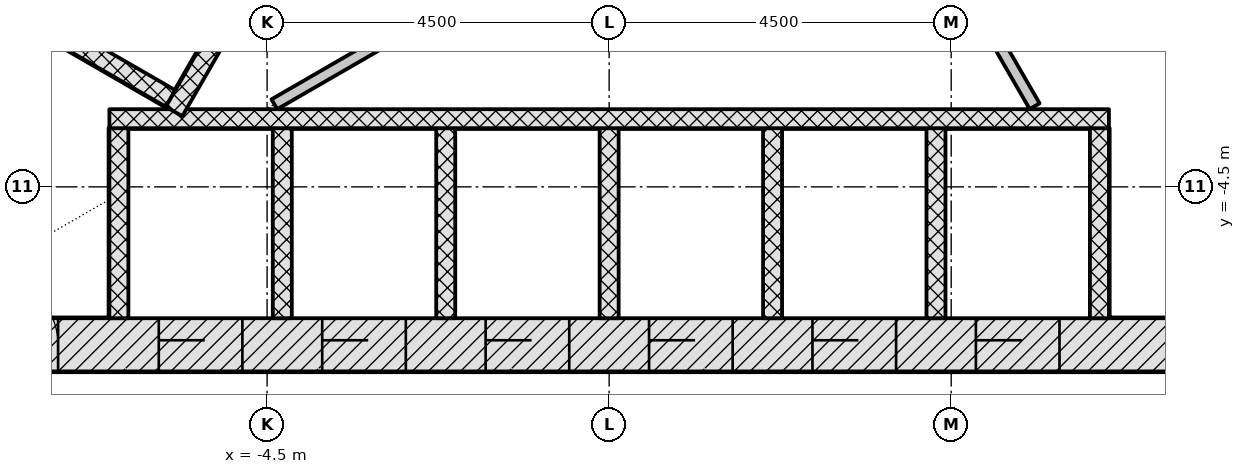
"""IFC4 building model, lengths in metres.
Left out: names, types, materials, properties, quantities, classifications, styles, units other than length and angle.
Written with IfcOpenShell. Run it as: python <this file> out.ifc"""

import sys

from ifc_helpers import new_model, si_unit, direction, frame, frame_2d, origin, place, context, subcontext, project, spatial, rectangle, extrude, element, fill, save


model = new_model("IFC4")
c1 = context("Model", 3, precision=1e-05, world=origin(), true_north=direction((0.0, 1.0)))
c2 = subcontext(c1, "Body", "Model", "MODEL_VIEW")
j1 = project(units=[si_unit("LENGTHUNIT", "METRE"), si_unit("PLANEANGLEUNIT", "RADIAN")], contexts=[c1])
p1 = place(None, origin())
s1 = spatial("IfcSite", under=j1, at=p1, CompositionType="ELEMENT")
p2 = place(p1, origin())
s2 = spatial("IfcBuilding", under=s1, at=p2, CompositionType="ELEMENT")
p3 = place(p2, frame((0.0, 0.0, 27.6)))
s3 = spatial("IfcBuildingStorey", under=s2, at=p3, CompositionType="ELEMENT", Elevation=27.6)
p4 = place(p3, frame((-9.229, -6.578, -0.2), z_axis=(0.0, 0.0, 1.0), x_axis=(1.0, 0.0, 0.0)))
e1 = element("IfcWall", 1, at=p4, inside=s3, PredefinedType="SHEAR", context=c2, shape_type="SweptSolid", body=[
    extrude(rectangle(XDim=18.458, YDim=0.7, at=frame_2d((9.229, 0.0))), origin(), (0.0, 0.0, 1.0), 3.6),
])
p5 = place(p4, frame((3.304, 0.0, 0.2)))
e2 = element("IfcOpeningElement", 2, at=p5, cuts=e1, PredefinedType="OPENING", context=c2, shape_type="SweptSolid", body=[
    extrude(rectangle(XDim=1.1, YDim=2.1, at=frame_2d((0.55, 1.05))), frame((0.0, 0.36, 0.0), z_axis=(0.0, -1.0, 0.0), x_axis=(1.0, 0.0, 0.0)), (0.0, 0.0, 1.0), 0.72),
])
p6 = place(p4, frame((5.454, 0.0, 0.2)))
e3 = element("IfcOpeningElement", 3, at=p6, cuts=e1, PredefinedType="OPENING", context=c2, shape_type="SweptSolid", body=[
    extrude(rectangle(XDim=1.1, YDim=2.1, at=frame_2d((0.55, 1.05))), frame((0.0, 0.36, 0.0), z_axis=(0.0, -1.0, 0.0), x_axis=(1.0, 0.0, 0.0)), (0.0, 0.0, 1.0), 0.72),
])
p7 = place(p4, frame((7.604, 0.0, 0.2)))
e4 = element("IfcOpeningElement", 4, at=p7, cuts=e1, PredefinedType="OPENING", context=c2, shape_type="SweptSolid", body=[
    extrude(rectangle(XDim=1.1, YDim=2.1, at=frame_2d((0.55, 1.05))), frame((0.0, 0.36, 0.0), z_axis=(0.0, -1.0, 0.0), x_axis=(1.0, 0.0, 0.0)), (0.0, 0.0, 1.0), 0.72),
])
p8 = place(p4, frame((9.754, 0.0, 0.2)))
e5 = element("IfcOpeningElement", 5, at=p8, cuts=e1, PredefinedType="OPENING", context=c2, shape_type="SweptSolid", body=[
    extrude(rectangle(XDim=1.1, YDim=2.1, at=frame_2d((0.55, 1.05))), frame((0.0, 0.36, 0.0), z_axis=(0.0, -1.0, 0.0), x_axis=(1.0, 0.0, 0.0)), (0.0, 0.0, 1.0), 0.72),
])
p9 = place(p4, frame((11.904, 0.0, 0.2)))
e6 = element("IfcOpeningElement", 6, at=p9, cuts=e1, PredefinedType="OPENING", context=c2, shape_type="SweptSolid", body=[
    extrude(rectangle(XDim=1.1, YDim=2.1, at=frame_2d((0.55, 1.05))), frame((0.0, 0.36, 0.0), z_axis=(0.0, -1.0, 0.0), x_axis=(1.0, 0.0, 0.0)), (0.0, 0.0, 1.0), 0.72),
])
p10 = place(p4, frame((14.054, 0.0, 0.2)))
e7 = element("IfcOpeningElement", 7, at=p10, cuts=e1, PredefinedType="OPENING", context=c2, shape_type="SweptSolid", body=[
    extrude(rectangle(XDim=1.1, YDim=2.1, at=frame_2d((0.55, 1.05))), frame((0.0, 0.36, 0.0), z_axis=(0.0, -1.0, 0.0), x_axis=(1.0, 0.0, 0.0)), (0.0, 0.0, 1.0), 0.72),
])
p11 = place(p4, frame((1.079, 0.0, 0.2)))
e8 = element("IfcOpeningElement", 8, at=p11, cuts=e1, PredefinedType="OPENING", context=c2, shape_type="SweptSolid", body=[
    extrude(rectangle(XDim=0.9, YDim=2.1, at=frame_2d((0.45, 1.05))), frame((0.0, 0.36, 0.0), z_axis=(0.0, -1.0, 0.0), x_axis=(1.0, 0.0, 0.0)), (0.0, 0.0, 1.0), 0.72),
])
p12 = place(p3, frame((10.311, -4.703, -0.2), z_axis=(0.0, 0.0, 1.0), x_axis=(-0.500001446645, 0.866024568562, 0.0)))
e9 = element("IfcWall", 9, at=p12, inside=s3, PredefinedType="SHEAR", context=c2, shape_type="SweptSolid", body=[
    extrude(rectangle(XDim=18.458, YDim=0.7, at=frame_2d((9.229, 0.0))), origin(), (0.0, 0.0, 1.0), 3.6),
])
p13 = place(p12, frame((8.7, 0.0, 0.2)))
e10 = element("IfcOpeningElement", 10, at=p13, cuts=e9, PredefinedType="OPENING", context=c2, shape_type="SweptSolid", body=[
    extrude(rectangle(XDim=1.0, YDim=2.1, at=frame_2d((0.5, 1.05))), frame((0.0, 0.36, 0.0), z_axis=(0.0, -1.0, 0.0), x_axis=(1.0, 0.0, 0.0)), (0.0, 0.0, 1.0), 0.72),
])
p14 = place(p12, frame((3.99, 0.0, 0.2)))
e11 = element("IfcOpeningElement", 11, at=p14, cuts=e9, PredefinedType="OPENING", context=c2, shape_type="SweptSolid", body=[
    extrude(rectangle(XDim=0.9, YDim=2.1, at=frame_2d((0.45, 1.05))), frame((0.0, 0.36, 0.0), z_axis=(0.0, -1.0, 0.0), x_axis=(1.0, 0.0, 0.0)), (0.0, 0.0, 1.0), 0.72),
])
p15 = place(p12, frame((13.539, 0.0, 0.2)))
e12 = element("IfcOpeningElement", 12, at=p15, cuts=e9, PredefinedType="OPENING", context=c2, shape_type="SweptSolid", body=[
    extrude(rectangle(XDim=0.9, YDim=2.1, at=frame_2d((0.45, 1.05))), frame((0.0, 0.36, 0.0), z_axis=(0.0, -1.0, 0.0), x_axis=(1.0, 0.0, 0.0)), (0.0, 0.0, 1.0), 0.72),
])
p16 = place(p3, frame((-1.083, 11.281, -0.2), z_axis=(0.0, 0.0, 1.0), x_axis=(-0.500001446645, -0.866024568562, 0.0)))
e13 = element("IfcWall", 13, at=p16, inside=s3, PredefinedType="SHEAR", context=c2, shape_type="SweptSolid", body=[
    extrude(rectangle(XDim=18.458, YDim=0.7, at=frame_2d((9.229, 0.0))), origin(), (0.0, 0.0, 1.0), 3.6),
])
p17 = place(p16, frame((8.979, 0.0, 0.2)))
e14 = element("IfcOpeningElement", 14, at=p17, cuts=e13, PredefinedType="OPENING", context=c2, shape_type="SweptSolid", body=[
    extrude(rectangle(XDim=1.2, YDim=2.1, at=frame_2d((0.6, 1.05))), frame((0.0, 0.36, 0.0), z_axis=(0.0, -1.0, 0.0), x_axis=(1.0, 0.0, 0.0)), (0.0, 0.0, 1.0), 0.72),
])
p18 = place(p16, frame((11.029, 0.0, 0.2)))
e15 = element("IfcOpeningElement", 15, at=p18, cuts=e13, PredefinedType="OPENING", context=c2, shape_type="SweptSolid", body=[
    extrude(rectangle(XDim=1.2, YDim=2.1, at=frame_2d((0.6, 1.05))), frame((0.0, 0.36, 0.0), z_axis=(0.0, -1.0, 0.0), x_axis=(1.0, 0.0, 0.0)), (0.0, 0.0, 1.0), 0.72),
])
for number, where, z_axis, x_axis in (
    (16, (-6.45, -6.228, -0.2), (0.0, 0.0, 1.0), (0.0, 1.0, 0.0)),
    (17, (-4.3, -6.228, -0.2), (0.0, 0.0, 1.0), (0.0, 1.0, 0.0)),
    (18, (-2.15, -6.228, -0.2), (0.0, 0.0, 1.0), (0.0, 1.0, 0.0)),
    (19, (0.0, -6.228, -0.2), (0.0, 0.0, 1.0), (0.0, 1.0, 0.0)),
    (20, (2.15, -6.228, -0.2), (0.0, 0.0, 1.0), (0.0, 1.0, 0.0)),
    (21, (4.3, -6.228, -0.2), (0.0, 0.0, 1.0), (0.0, 1.0, 0.0)),
    (22, (6.45, -6.228, -0.2), (0.0, 0.0, 1.0), (0.0, 1.0, 0.0)),
):
    element("IfcWall", number, at=place(p3, frame(where, z_axis=z_axis, x_axis=x_axis)), inside=s3, PredefinedType="PARTITIONING", context=c2, shape_type="SweptSolid", body=[
        extrude(rectangle(XDim=2.5, YDim=0.25, at=frame_2d((1.25, 0.0))), origin(), (0.0, 0.0, 1.0), 3.6),
    ])
p19 = place(p3, frame((-6.575, -3.603, 0.0), z_axis=(0.0, 0.0, 1.0), x_axis=(1.0, 0.0, 0.0)))
e23 = element("IfcWall", 23, at=p19, inside=s3, PredefinedType="PARTITIONING", context=c2, shape_type="SweptSolid", body=[
    extrude(rectangle(XDim=13.15, YDim=0.25, at=frame_2d((6.575, 0.0))), origin(), (0.0, 0.0, 1.0), 3.4),
])
p20 = place(p3, frame((-8.281, -1.887, -0.2), z_axis=(0.0, 0.0, 1.0), x_axis=(0.866032775405, -0.499987231761, 0.0)))
e24 = element("IfcWall", 24, at=p20, inside=s3, PredefinedType="PARTITIONING", context=c2, shape_type="SweptSolid", body=[
    extrude(rectangle(XDim=2.9, YDim=0.25, at=frame_2d((1.45, 0.0))), origin(), (0.0, 0.0, 1.0), 3.6),
])
p21 = place(p3, frame((0.176, 6.711, 0.0), z_axis=(0.0, 0.0, 1.0), x_axis=(-0.500004227369, -0.866022963098, 0.0)))
e25 = element("IfcWall", 25, at=p21, inside=s3, PredefinedType="PARTITIONING", context=c2, shape_type="SweptSolid", body=[
    extrude(rectangle(XDim=11.8, YDim=0.25, at=frame_2d((5.9, 0.0))), origin(), (0.0, 0.0, 1.0), 3.4),
])
p22 = place(p3, frame((-4.404, -3.413, 0.0), z_axis=(0.0, 0.0, 1.0), x_axis=(0.866022252853, 0.500005457533, 0.0)))
e26 = element("IfcWall", 26, at=p22, inside=s3, PredefinedType="PARTITIONING", context=c2, shape_type="SweptSolid", body=[
    extrude(rectangle(XDim=11.749, YDim=0.15, at=frame_2d((5.875, 0.0))), origin(), (0.0, 0.0, 1.0), 3.4),
])
p23 = place(p22, frame((3.875, 0.0, 0.0)))
e27 = element("IfcOpeningElement", 27, at=p23, cuts=e26, PredefinedType="OPENING", context=c2, shape_type="SweptSolid", body=[
    extrude(rectangle(XDim=0.9, YDim=2.1, at=frame_2d((0.45, 1.05))), frame((0.0, 0.085, 0.0), z_axis=(0.0, -1.0, 0.0), x_axis=(1.0, 0.0, 0.0)), (0.0, 0.0, 1.0), 0.17),
])
p24 = place(p3, frame((5.598, -3.439, 0.0), z_axis=(0.0, 0.0, 1.0), x_axis=(-0.500007155043, 0.866021272779, 0.0)))
e28 = element("IfcWall", 28, at=p24, inside=s3, PredefinedType="PARTITIONING", context=c2, shape_type="SweptSolid", body=[
    extrude(rectangle(XDim=4.949, YDim=0.15, at=frame_2d((2.474, 0.0))), origin(), (0.0, 0.0, 1.0), 3.4),
])
p25 = place(p3, frame((-17.208, -3.699, 0.0), z_axis=(0.0, 0.0, 1.0), x_axis=(0.499997567621, 0.866026808115, 0.0)))
e29 = element("IfcWall", 29, at=p25, inside=s3, PredefinedType="PARTITIONING", context=c2, shape_type="SweptSolid", body=[
    extrude(rectangle(XDim=23.736, YDim=0.15, at=frame_2d((11.868, 0.0))), origin(), (0.0, 0.0, 1.0), 2.768),
])
p26 = place(p25, frame((16.656, 0.0, 0.0)))
e30 = element("IfcOpeningElement", 30, at=p26, cuts=e29, PredefinedType="OPENING", context=c2, shape_type="SweptSolid", body=[
    extrude(rectangle(XDim=1.1, YDim=2.1, at=frame_2d((0.55, 1.05))), frame((0.0, 0.085, 0.0), z_axis=(0.0, -1.0, 0.0), x_axis=(1.0, 0.0, 0.0)), (0.0, 0.0, 1.0), 0.17),
])
p27 = place(p25, frame((14.662, 0.0, 0.0)))
e31 = element("IfcOpeningElement", 31, at=p27, cuts=e29, PredefinedType="OPENING", context=c2, shape_type="SweptSolid", body=[
    extrude(rectangle(XDim=1.1, YDim=2.1, at=frame_2d((0.55, 1.05))), frame((0.0, 0.085, 0.0), z_axis=(0.0, -1.0, 0.0), x_axis=(1.0, 0.0, 0.0)), (0.0, 0.0, 1.0), 0.17),
])
p28 = place(p25, frame((5.273, 0.0, 0.0)))
e32 = element("IfcOpeningElement", 32, at=p28, cuts=e29, PredefinedType="OPENING", context=c2, shape_type="SweptSolid", body=[
    extrude(rectangle(XDim=1.0, YDim=2.1, at=frame_2d((0.5, 1.05))), frame((0.0, 0.085, 0.0), z_axis=(0.0, -1.0, 0.0), x_axis=(1.0, 0.0, 0.0)), (0.0, 0.0, 1.0), 0.17),
])
p29 = place(p3, frame((5.981, 8.446, 0.0), z_axis=(0.0, 0.0, 1.0), x_axis=(0.499996620721, -0.866027354803, 0.0)))
e33 = element("IfcWall", 33, at=p29, inside=s3, PredefinedType="PARTITIONING", context=c2, shape_type="SweptSolid", body=[
    extrude(rectangle(XDim=15.057, YDim=0.15, at=frame_2d((7.528, 0.0))), origin(), (0.0, 0.0, 1.0), 2.768),
])
p30 = place(p29, frame((9.087, 0.0, 0.0)))
e34 = element("IfcOpeningElement", 34, at=p30, cuts=e33, PredefinedType="OPENING", context=c2, shape_type="SweptSolid", body=[
    extrude(rectangle(XDim=1.1, YDim=2.1, at=frame_2d((0.55, 1.05))), frame((0.0, 0.085, 0.0), z_axis=(0.0, -1.0, 0.0), x_axis=(1.0, 0.0, 0.0)), (0.0, 0.0, 1.0), 0.17),
])
p31 = place(p29, frame((7.128, 0.0, 0.0)))
e35 = element("IfcOpeningElement", 35, at=p31, cuts=e33, PredefinedType="OPENING", context=c2, shape_type="SweptSolid", body=[
    extrude(rectangle(XDim=1.1, YDim=2.1, at=frame_2d((0.55, 1.05))), frame((0.0, 0.085, 0.0), z_axis=(0.0, -1.0, 0.0), x_axis=(1.0, 0.0, 0.0)), (0.0, 0.0, 1.0), 0.17),
])
p32 = place(p5, origin())
e36 = element("IfcDoor", 36, at=p32, inside=s3, OperationType="DOUBLE_DOOR_SLIDING", PredefinedType="DOOR", context=c2, shape_type="SweptSolid", body=[
    extrude(rectangle(XDim=1.1, YDim=2.1, at=frame_2d((0.55, 1.05))), frame((0.0, 0.025, 0.0), z_axis=(0.0, -1.0, 0.0), x_axis=(1.0, 0.0, 0.0)), (0.0, 0.0, 1.0), 0.05),
])
fill(e2, e36)
p33 = place(p6, origin())
e37 = element("IfcDoor", 37, at=p33, inside=s3, OperationType="DOUBLE_DOOR_SLIDING", PredefinedType="DOOR", context=c2, shape_type="SweptSolid", body=[
    extrude(rectangle(XDim=1.1, YDim=2.1, at=frame_2d((0.55, 1.05))), frame((0.0, 0.025, 0.0), z_axis=(0.0, -1.0, 0.0), x_axis=(1.0, 0.0, 0.0)), (0.0, 0.0, 1.0), 0.05),
])
fill(e3, e37)
p34 = place(p7, origin())
e38 = element("IfcDoor", 38, at=p34, inside=s3, OperationType="DOUBLE_DOOR_SLIDING", PredefinedType="DOOR", context=c2, shape_type="SweptSolid", body=[
    extrude(rectangle(XDim=1.1, YDim=2.1, at=frame_2d((0.55, 1.05))), frame((0.0, 0.025, 0.0), z_axis=(0.0, -1.0, 0.0), x_axis=(1.0, 0.0, 0.0)), (0.0, 0.0, 1.0), 0.05),
])
fill(e4, e38)
p35 = place(p8, origin())
e39 = element("IfcDoor", 39, at=p35, inside=s3, OperationType="DOUBLE_DOOR_SLIDING", PredefinedType="DOOR", context=c2, shape_type="SweptSolid", body=[
    extrude(rectangle(XDim=1.1, YDim=2.1, at=frame_2d((0.55, 1.05))), frame((0.0, 0.025, 0.0), z_axis=(0.0, -1.0, 0.0), x_axis=(1.0, 0.0, 0.0)), (0.0, 0.0, 1.0), 0.05),
])
fill(e5, e39)
p36 = place(p9, origin())
e40 = element("IfcDoor", 40, at=p36, inside=s3, OperationType="DOUBLE_DOOR_SLIDING", PredefinedType="DOOR", context=c2, shape_type="SweptSolid", body=[
    extrude(rectangle(XDim=1.1, YDim=2.1, at=frame_2d((0.55, 1.05))), frame((0.0, 0.025, 0.0), z_axis=(0.0, -1.0, 0.0), x_axis=(1.0, 0.0, 0.0)), (0.0, 0.0, 1.0), 0.05),
])
fill(e6, e40)
p37 = place(p10, origin())
e41 = element("IfcDoor", 41, at=p37, inside=s3, OperationType="DOUBLE_DOOR_SLIDING", PredefinedType="DOOR", context=c2, shape_type="SweptSolid", body=[
    extrude(rectangle(XDim=1.1, YDim=2.1, at=frame_2d((0.55, 1.05))), frame((0.0, 0.025, 0.0), z_axis=(0.0, -1.0, 0.0), x_axis=(1.0, 0.0, 0.0)), (0.0, 0.0, 1.0), 0.05),
])
fill(e7, e41)
p38 = place(p11, origin())
e42 = element("IfcDoor", 42, at=p38, inside=s3, OperationType="SINGLE_SWING_LEFT", PredefinedType="DOOR", context=c2, shape_type="SweptSolid", body=[
    extrude(rectangle(XDim=0.9, YDim=2.1, at=frame_2d((0.45, 1.05))), frame((0.0, 0.075, 0.0), z_axis=(0.0, -1.0, 0.0), x_axis=(1.0, 0.0, 0.0)), (0.0, 0.0, 1.0), 0.15),
])
fill(e8, e42)
save(model, sys.argv[1])
